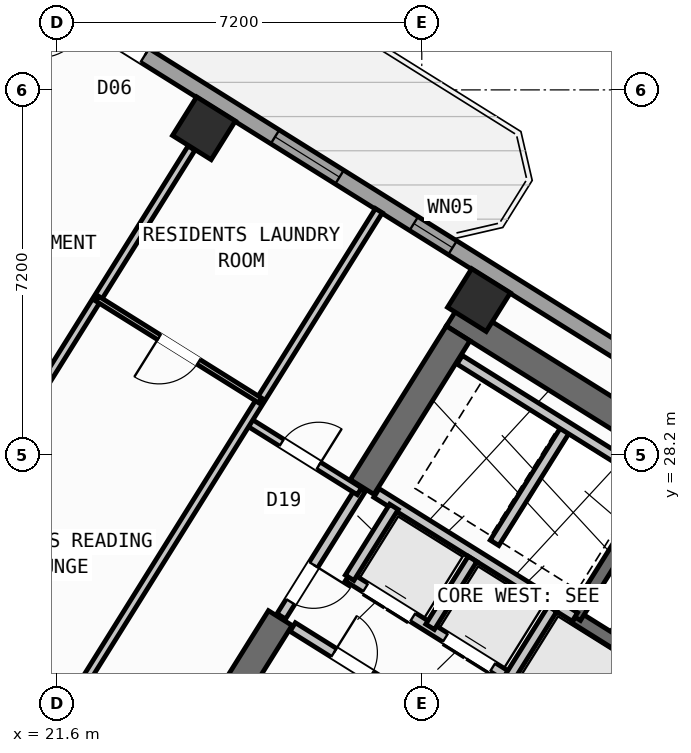
"""IFC4 building model, lengths in metres.
Left out: names, types, materials, properties, quantities, classifications, styles, units other than length and angle.
Written with IfcOpenShell. Run it as: python <this file> out.ifc"""

import sys

from ifc_helpers import new_model, si_unit, direction, frame, frame_2d, origin, origin_2d, place, context, subcontext, project, spatial, rectangle, hollow_rectangle, extrude, source, transform, mapped, element, fill, save


model = new_model("IFC4")
c1 = context("Model", 3, precision=1e-05, world=origin(), true_north=direction((0.0, 1.0)))
c2 = subcontext(c1, "Body", "Model", "MODEL_VIEW")
j1 = project(units=[si_unit("LENGTHUNIT", "METRE"), si_unit("PLANEANGLEUNIT", "RADIAN")], contexts=[c1])
p1 = place(None, origin())
s1 = spatial("IfcSite", under=j1, at=p1, CompositionType="ELEMENT")
p2 = place(p1, origin())
s2 = spatial("IfcBuilding", under=s1, at=p2, CompositionType="ELEMENT")
p3 = place(p2, frame((0.0, 0.0, 151.5)))
s3 = spatial("IfcBuildingStorey", under=s2, at=p3, CompositionType="ELEMENT", Elevation=151.5)
p4 = place(p3, frame((40.573, 24.01, 0.0), z_axis=(0.0, 0.0, 1.0), x_axis=(-0.848047359947, 0.529920442413, 0.0)))
e1 = element("IfcWall", 1, at=p4, inside=s3, PredefinedType="SHEAR", context=c2, shape_type="SweptSolid", body=[
    extrude(rectangle(XDim=13.14, YDim=0.55, at=frame_2d((6.57, 0.0))), origin(), (0.0, 0.0, 1.0), 3.35),
])
p5 = place(p3, frame((29.517, 30.594, 0.0), z_axis=(0.0, 0.0, 1.0), x_axis=(-0.529906864564, -0.848055844204, 0.0)))
e2 = element("IfcWall", 2, at=p5, inside=s3, PredefinedType="SHEAR", context=c2, shape_type="SweptSolid", body=[
    extrude(rectangle(XDim=3.575, YDim=0.55, at=frame_2d((1.788, 0.0))), origin(), (0.0, 0.0, 1.0), 3.35),
])
p6 = place(p3, frame((26.007, 24.976, 0.0), z_axis=(0.0, 0.0, 1.0), x_axis=(-0.529923795287, -0.848045264823, 0.0)))
e3 = element("IfcWall", 3, at=p6, inside=s3, PredefinedType="SHEAR", context=c2, shape_type="SweptSolid", body=[
    extrude(rectangle(XDim=6.425, YDim=0.55, at=frame_2d((3.212, 0.0))), origin(), (0.0, 0.0, 1.0), 3.35),
])
m1 = source(origin(), c2, "Body", "SweptSolid", [
    extrude(hollow_rectangle(XDim=0.9, YDim=0.9, WallThickness=0.036, at=origin_2d()), origin(), (0.0, 0.0, 1.0), 3.6),
])
for number, where, z_axis, x_axis in (
    (4, (29.928, 31.251, 0.0), (0.0, 0.0, 1.0), (-0.848, 0.53, 0.0)),
    (5, (24.5, 34.643, 0.0), (0.0, 0.0, 1.0), (-0.848, 0.53, 0.0)),
):
    element("IfcColumn", number, at=place(p3, frame(where, z_axis=z_axis, x_axis=x_axis)), inside=s3, PredefinedType="COLUMN", context=c2, shape_type="MappedRepresentation", body=[
        mapped(m1, transform((0.0, 0.0, 0.0), scale=1.0)),
    ])
p7 = place(p3, frame((14.138, 41.825, 0.0), z_axis=(0.0, 0.0, 1.0), x_axis=(0.848046498049, -0.529921821731, 0.0)))
e6 = element("IfcWall", 6, at=p7, inside=s3, PredefinedType="STANDARD", context=c2, shape_type="SweptSolid", body=[
    extrude(rectangle(XDim=31.588, YDim=0.32, at=frame_2d((15.794, 0.0))), origin(), (0.0, 0.0, 1.0), 3.35),
])
p8 = place(p7, frame((9.792, 0.0, 0.0)))
e7 = element("IfcOpeningElement", 7, at=p8, cuts=e6, PredefinedType="OPENING", context=c2, shape_type="SweptSolid", body=[
    extrude(rectangle(XDim=1.05, YDim=2.15, at=frame_2d((0.525, 1.075))), frame((0.0, 0.17, 0.0), z_axis=(0.0, -1.0, 0.0), x_axis=(1.0, 0.0, 0.0)), (0.0, 0.0, 1.0), 0.34),
])
p9 = place(p7, frame((0.791, 0.0, 0.85)))
e8 = element("IfcOpeningElement", 8, at=p9, cuts=e6, PredefinedType="OPENING", context=c2, shape_type="SweptSolid", body=[
    extrude(rectangle(XDim=1.8, YDim=1.5, at=frame_2d((0.9, 0.75))), frame((0.0, 0.17, 0.0), z_axis=(0.0, -1.0, 0.0), x_axis=(1.0, 0.0, 0.0)), (0.0, 0.0, 1.0), 0.34),
])
p10 = place(p7, frame((3.996, 0.0, 0.95)))
e9 = element("IfcOpeningElement", 9, at=p10, cuts=e6, PredefinedType="OPENING", context=c2, shape_type="SweptSolid", body=[
    extrude(rectangle(XDim=1.2, YDim=1.4, at=frame_2d((0.6, 0.7))), frame((0.0, 0.17, 0.0), z_axis=(0.0, -1.0, 0.0), x_axis=(1.0, 0.0, 0.0)), (0.0, 0.0, 1.0), 0.34),
])
p11 = place(p7, frame((13.874, 0.0, 0.85)))
e10 = element("IfcOpeningElement", 10, at=p11, cuts=e6, PredefinedType="OPENING", context=c2, shape_type="SweptSolid", body=[
    extrude(rectangle(XDim=1.5, YDim=1.5, at=frame_2d((0.75, 0.75))), frame((0.0, 0.17, 0.0), z_axis=(0.0, -1.0, 0.0), x_axis=(1.0, 0.0, 0.0)), (0.0, 0.0, 1.0), 0.34),
])
p12 = place(p7, frame((17.104, 0.0, 1.0)))
e11 = element("IfcOpeningElement", 11, at=p12, cuts=e6, PredefinedType="OPENING", context=c2, shape_type="SweptSolid", body=[
    extrude(rectangle(XDim=0.9, YDim=1.25, at=frame_2d((0.45, 0.625))), frame((0.0, 0.17, 0.0), z_axis=(0.0, -1.0, 0.0), x_axis=(1.0, 0.0, 0.0)), (0.0, 0.0, 1.0), 0.34),
])
p13 = place(p7, frame((22.069, 0.0, 1.0)))
e12 = element("IfcOpeningElement", 12, at=p13, cuts=e6, PredefinedType="OPENING", context=c2, shape_type="SweptSolid", body=[
    extrude(rectangle(XDim=0.9, YDim=1.25, at=frame_2d((0.45, 0.625))), frame((0.0, 0.17, 0.0), z_axis=(0.0, -1.0, 0.0), x_axis=(1.0, 0.0, 0.0)), (0.0, 0.0, 1.0), 0.34),
])
p14 = place(p7, frame((27.519, 0.0, 1.0)))
e13 = element("IfcOpeningElement", 13, at=p14, cuts=e6, PredefinedType="OPENING", context=c2, shape_type="SweptSolid", body=[
    extrude(rectangle(XDim=0.9, YDim=1.25, at=frame_2d((0.45, 0.625))), frame((0.0, 0.17, 0.0), z_axis=(0.0, -1.0, 0.0), x_axis=(1.0, 0.0, 0.0)), (0.0, 0.0, 1.0), 0.34),
])
p15 = place(p3, frame((38.046, 21.108, 0.0), z_axis=(0.0, 0.0, 1.0), x_axis=(-0.848054434086, 0.529909121291, 0.0)))
e14 = element("IfcWall", 14, at=p15, inside=s3, PredefinedType="SHEAR", context=c2, shape_type="SweptSolid", body=[
    extrude(rectangle(XDim=7.33, YDim=0.26, at=frame_2d((3.665, 0.0))), origin(), (0.0, 0.0, 1.0), 3.35),
])
p16 = place(p15, frame((0.22, 0.0, 0.0)))
e15 = element("IfcOpeningElement", 15, at=p16, cuts=e14, PredefinedType="OPENING", context=c2, shape_type="SweptSolid", body=[
    extrude(rectangle(XDim=1.1, YDim=2.1, at=frame_2d((0.55, 1.05))), frame((0.0, 0.14, 0.0), z_axis=(0.0, -1.0, 0.0), x_axis=(1.0, 0.0, 0.0)), (0.0, 0.0, 1.0), 0.28),
])
p17 = place(p3, frame((33.496, 27.677, 0.0), z_axis=(0.0, 0.0, 1.0), x_axis=(-0.529908658664, -0.84805472316, 0.0)))
e16 = element("IfcWall", 16, at=p17, inside=s3, PredefinedType="SHEAR", context=c2, shape_type="SweptSolid", body=[
    extrude(rectangle(XDim=3.16, YDim=0.26, at=frame_2d((1.58, 0.0))), origin(), (0.0, 0.0, 1.0), 3.35),
])
p18 = place(p3, frame((31.822, 24.998, 0.0), z_axis=(0.0, 0.0, 1.0), x_axis=(-0.848036912365, 0.52993716162, 0.0)))
e17 = element("IfcWall", 17, at=p18, inside=s3, PredefinedType="STANDARD", context=c2, shape_type="SweptSolid", body=[
    extrude(rectangle(XDim=4.618, YDim=0.2, at=frame_2d((2.309, 0.0))), origin(), (0.0, 0.0, 1.0), 3.34),
])
p19 = place(p3, frame((32.108, 22.814, 0.0), z_axis=(0.0, 0.0, 1.0), x_axis=(-0.848042229521, 0.529928652696, 0.0)))
e18 = element("IfcWall", 18, at=p19, inside=s3, PredefinedType="STANDARD", context=c2, shape_type="SweptSolid", body=[
    extrude(rectangle(XDim=5.62, YDim=0.2, at=frame_2d((2.81, 0.0))), origin(), (0.0, 0.0, 1.0), 3.34),
])
p20 = place(p19, frame((0.39, 0.0, 0.0)))
e19 = element("IfcOpeningElement", 19, at=p20, cuts=e18, PredefinedType="OPENING", context=c2, shape_type="SweptSolid", body=[
    extrude(rectangle(XDim=1.1, YDim=2.15, at=frame_2d((0.55, 1.075))), frame((0.0, 0.11, 0.0), z_axis=(0.0, -1.0, 0.0), x_axis=(1.0, 0.0, 0.0)), (0.0, 0.0, 1.0), 0.22),
])
p21 = place(p19, frame((2.25, 0.0, 0.0)))
e20 = element("IfcOpeningElement", 20, at=p21, cuts=e18, PredefinedType="OPENING", context=c2, shape_type="SweptSolid", body=[
    extrude(rectangle(XDim=1.1, YDim=2.15, at=frame_2d((0.55, 1.075))), frame((0.0, 0.11, 0.0), z_axis=(0.0, -1.0, 0.0), x_axis=(1.0, 0.0, 0.0)), (0.0, 0.0, 1.0), 0.22),
])
p22 = place(p19, frame((4.11, 0.0, 0.0)))
e21 = element("IfcOpeningElement", 21, at=p22, cuts=e18, PredefinedType="OPENING", context=c2, shape_type="SweptSolid", body=[
    extrude(rectangle(XDim=1.1, YDim=2.15, at=frame_2d((0.55, 1.075))), frame((0.0, 0.11, 0.0), z_axis=(0.0, -1.0, 0.0), x_axis=(1.0, 0.0, 0.0)), (0.0, 0.0, 1.0), 0.22),
])
p23 = place(p3, frame((32.982, 24.213, 0.0), z_axis=(0.0, 0.0, 1.0), x_axis=(-0.529839334948, -0.84809803628, 0.0)))
e22 = element("IfcWall", 22, at=p23, inside=s3, PredefinedType="STANDARD", context=c2, shape_type="SweptSolid", body=[
    extrude(rectangle(XDim=1.65, YDim=0.2, at=frame_2d((0.825, 0.0))), origin(), (0.0, 0.0, 1.0), 3.34),
])
p24 = place(p3, frame((28.25, 27.17, 0.0), z_axis=(0.0, 0.0, 1.0), x_axis=(-0.529905827651, -0.848056492117, 0.0)))
e23 = element("IfcWall", 23, at=p24, inside=s3, PredefinedType="STANDARD", context=c2, shape_type="SweptSolid", body=[
    extrude(rectangle(XDim=1.65, YDim=0.2, at=frame_2d((0.825, 0.0))), origin(), (0.0, 0.0, 1.0), 3.34),
])
p25 = place(p3, frame((31.645, 28.716, 0.0), z_axis=(0.0, 0.0, 1.0), x_axis=(-0.52986693015, -0.848080795876, 0.0)))
e24 = element("IfcWall", 24, at=p25, inside=s3, PredefinedType="STANDARD", context=c2, shape_type="SweptSolid", body=[
    extrude(rectangle(XDim=2.66, YDim=0.2, at=frame_2d((1.33, 0.0))), origin(), (0.0, 0.0, 1.0), 3.34),
])
p26 = place(p3, frame((33.363, 27.69, 0.0), z_axis=(0.0, 0.0, 1.0), x_axis=(-0.848047090064, 0.529920874315, 0.0)))
e25 = element("IfcWall", 25, at=p26, inside=s3, PredefinedType="STANDARD", context=c2, shape_type="SweptSolid", body=[
    extrude(rectangle(XDim=4.498, YDim=0.2, at=frame_2d((2.249, 0.0))), origin(), (0.0, 0.0, 1.0), 3.34),
])
for number, where, z_axis, x_axis in (
    (26, (31.379, 25.156, 0.0), (0.0, 0.0, 1.0), (-0.53, -0.848, 0.0)),
    (27, (29.801, 26.142, 0.0), (0.0, 0.0, 1.0), (-0.53, -0.848, 0.0)),
):
    element("IfcWall", number, at=place(p3, frame(where, z_axis=z_axis, x_axis=x_axis)), inside=s3, PredefinedType="STANDARD", context=c2, shape_type="SweptSolid", body=[
        extrude(rectangle(XDim=1.58, YDim=0.2, at=frame_2d((0.79, 0.0))), origin(), (0.0, 0.0, 1.0), 3.34),
    ])
p27 = place(p3, frame((31.525, 21.504, 0.0), z_axis=(0.0, 0.0, 1.0), x_axis=(-0.848040211232, 0.529931882541, 0.0)))
e28 = element("IfcWall", 28, at=p27, inside=s3, PredefinedType="STANDARD", context=c2, shape_type="SweptSolid", body=[
    extrude(rectangle(XDim=6.218, YDim=0.2, at=frame_2d((3.109, 0.0))), origin(), (0.0, 0.0, 1.0), 3.34),
])
p28 = place(p27, frame((4.4, 0.0, 0.0)))
e29 = element("IfcOpeningElement", 29, at=p28, cuts=e28, PredefinedType="OPENING", context=c2, shape_type="SweptSolid", body=[
    extrude(rectangle(XDim=0.86, YDim=2.05, at=frame_2d((0.43, 1.025))), frame((0.0, 0.11, 0.0), z_axis=(0.0, -1.0, 0.0), x_axis=(1.0, 0.0, 0.0)), (0.0, 0.0, 1.0), 0.22),
])
p29 = place(p27, frame((0.35, 0.0, 0.0)))
e30 = element("IfcOpeningElement", 30, at=p29, cuts=e28, PredefinedType="OPENING", context=c2, shape_type="SweptSolid", body=[
    extrude(rectangle(XDim=0.86, YDim=2.05, at=frame_2d((0.43, 1.025))), frame((0.0, 0.11, 0.0), z_axis=(0.0, -1.0, 0.0), x_axis=(1.0, 0.0, 0.0)), (0.0, 0.0, 1.0), 0.22),
])
p30 = place(p3, frame((27.596, 27.52, 0.0), z_axis=(0.0, 0.0, 1.0), x_axis=(-0.529865479138, -0.848081702443, 0.0)))
e31 = element("IfcWall", 31, at=p30, inside=s3, PredefinedType="STANDARD", context=c2, shape_type="SweptSolid", body=[
    extrude(rectangle(XDim=2.96, YDim=0.2, at=frame_2d((1.48, 0.0))), origin(), (0.0, 0.0, 1.0), 3.34),
])
p31 = place(p30, frame((1.76, 0.0, 0.0)))
e32 = element("IfcOpeningElement", 32, at=p31, cuts=e31, PredefinedType="OPENING", context=c2, shape_type="SweptSolid", body=[
    extrude(rectangle(XDim=0.86, YDim=2.05, at=frame_2d((0.43, 1.025))), frame((0.0, 0.11, 0.0), z_axis=(0.0, -1.0, 0.0), x_axis=(1.0, 0.0, 0.0)), (0.0, 0.0, 1.0), 0.22),
])
p32 = place(p3, frame((27.57, 27.478, 0.0), z_axis=(0.0, 0.0, 1.0), x_axis=(-0.848050851465, 0.529914854792, 0.0)))
e33 = element("IfcWall", 33, at=p32, inside=s3, PredefinedType="PARTITIONING", context=c2, shape_type="SweptSolid", body=[
    extrude(rectangle(XDim=2.61, YDim=0.16, at=frame_2d((1.305, 0.0))), origin(), (0.0, 0.0, 1.0), 3.34),
])
p33 = place(p32, frame((0.95, 0.0, 0.0)))
e34 = element("IfcOpeningElement", 34, at=p33, cuts=e33, PredefinedType="OPENING", context=c2, shape_type="SweptSolid", body=[
    extrude(rectangle(XDim=0.86, YDim=2.05, at=frame_2d((0.43, 1.025))), frame((0.0, 0.09, 0.0), z_axis=(0.0, -1.0, 0.0), x_axis=(1.0, 0.0, 0.0)), (0.0, 0.0, 1.0), 0.18),
])
p34 = place(p3, frame((27.953, 33.016, 0.0), z_axis=(0.0, 0.0, 1.0), x_axis=(-0.529905022231, -0.848056995381, 0.0)))
e35 = element("IfcWall", 35, at=p34, inside=s3, PredefinedType="PARTITIONING", context=c2, shape_type="SweptSolid", body=[
    extrude(rectangle(XDim=11.45, YDim=0.16, at=frame_2d((5.725, 0.0))), origin(), (0.0, 0.0, 1.0), 3.34),
])
p35 = place(p3, frame((21.885, 23.306, 0.0), z_axis=(0.0, 0.0, 1.0), x_axis=(-0.848052408131, 0.529912363569, 0.0)))
e36 = element("IfcWall", 36, at=p35, inside=s3, PredefinedType="PARTITIONING", context=c2, shape_type="SweptSolid", body=[
    extrude(rectangle(XDim=16.73, YDim=0.16, at=frame_2d((8.365, 0.0))), origin(), (0.0, 0.0, 1.0), 3.34),
])
p36 = place(p35, frame((1.395, 0.0, 0.0)))
e37 = element("IfcOpeningElement", 37, at=p36, cuts=e36, PredefinedType="OPENING", context=c2, shape_type="SweptSolid", body=[
    extrude(rectangle(XDim=1.0, YDim=2.1, at=frame_2d((0.5, 1.05))), frame((0.0, 0.09, 0.0), z_axis=(0.0, -1.0, 0.0), x_axis=(1.0, 0.0, 0.0)), (0.0, 0.0, 1.0), 0.18),
])
p37 = place(p35, frame((7.82, 0.0, 0.0)))
e38 = element("IfcOpeningElement", 38, at=p37, cuts=e36, PredefinedType="OPENING", context=c2, shape_type="SweptSolid", body=[
    extrude(rectangle(XDim=1.0, YDim=2.1, at=frame_2d((0.5, 1.05))), frame((0.0, 0.09, 0.0), z_axis=(0.0, -1.0, 0.0), x_axis=(1.0, 0.0, 0.0)), (0.0, 0.0, 1.0), 0.18),
])
p38 = place(p35, frame((11.14, 0.0, 0.0)))
e39 = element("IfcOpeningElement", 39, at=p38, cuts=e36, PredefinedType="OPENING", context=c2, shape_type="SweptSolid", body=[
    extrude(rectangle(XDim=1.0, YDim=2.1, at=frame_2d((0.5, 1.05))), frame((0.0, 0.09, 0.0), z_axis=(0.0, -1.0, 0.0), x_axis=(1.0, 0.0, 0.0)), (0.0, 0.0, 1.0), 0.18),
])
p39 = place(p3, frame((24.256, 34.251, 0.0), z_axis=(0.0, 0.0, 1.0), x_axis=(-0.529919772691, -0.848047778437, 0.0)))
e40 = element("IfcWall", 40, at=p39, inside=s3, PredefinedType="PARTITIONING", context=c2, shape_type="SweptSolid", body=[
    extrude(rectangle(XDim=6.376, YDim=0.16, at=frame_2d((3.188, 0.0))), origin(), (0.0, 0.0, 1.0), 2.775),
])
p40 = place(p3, frame((25.612, 29.269, 0.0), z_axis=(0.0, 0.0, 1.0), x_axis=(-0.84803087207, 0.529946827537, 0.0)))
e41 = element("IfcWall", 41, at=p40, inside=s3, PredefinedType="PARTITIONING", context=c2, shape_type="SweptSolid", body=[
    extrude(rectangle(XDim=3.79, YDim=0.11, at=frame_2d((1.895, 0.0))), origin(), (0.0, 0.0, 1.0), 3.34),
])
p41 = place(p40, frame((1.435, 0.0, 0.0)))
e42 = element("IfcOpeningElement", 42, at=p41, cuts=e41, PredefinedType="OPENING", context=c2, shape_type="SweptSolid", body=[
    extrude(rectangle(XDim=0.92, YDim=2.08, at=frame_2d((0.46, 1.04))), frame((0.0, 0.065, 0.0), z_axis=(0.0, -1.0, 0.0), x_axis=(1.0, 0.0, 0.0)), (0.0, 0.0, 1.0), 0.13),
])
p42 = place(p3, frame((21.517, 37.356, 0.0), z_axis=(0.0, 0.0, 1.0), x_axis=(-0.529919705034, -0.848047820713, 0.0)))
e43 = element("IfcWall", 43, at=p42, inside=s3, PredefinedType="PARTITIONING", context=c2, shape_type="SweptSolid", body=[
    extrude(rectangle(XDim=9.14, YDim=0.11, at=frame_2d((4.57, 0.0))), origin(), (0.0, 0.0, 1.0), 3.34),
])
p43 = place(p42, frame((0.47, 0.0, 0.0)))
e44 = element("IfcOpeningElement", 44, at=p43, cuts=e43, PredefinedType="OPENING", context=c2, shape_type="SweptSolid", body=[
    extrude(rectangle(XDim=0.92, YDim=2.08, at=frame_2d((0.46, 1.04))), frame((0.0, 0.065, 0.0), z_axis=(0.0, -1.0, 0.0), x_axis=(1.0, 0.0, 0.0)), (0.0, 0.0, 1.0), 0.13),
])
m2 = source(origin(), c2, "Body", "SweptSolid", [
    extrude(rectangle(XDim=1.05, YDim=2.15, at=frame_2d((0.525, 1.075))), frame((0.0, 0.025, 0.0), z_axis=(0.0, -1.0, 0.0), x_axis=(1.0, 0.0, 0.0)), (0.0, 0.0, 1.0), 0.05),
])
p44 = place(p8, origin())
e45 = element("IfcDoor", 45, at=p44, inside=s3, OperationType="SINGLE_SWING_RIGHT", PredefinedType="DOOR", context=c2, shape_type="MappedRepresentation", body=[
    mapped(m2, transform((0.0, 0.0, 0.0), scale=1.0)),
])
fill(e7, e45)
m3 = source(origin(), c2, "Body", "SweptSolid", [
    extrude(rectangle(XDim=1.5, YDim=1.5, at=frame_2d((0.75, 0.75))), frame((0.0, 0.03, 0.0), z_axis=(0.0, -1.0, 0.0), x_axis=(1.0, 0.0, 0.0)), (0.0, 0.0, 1.0), 0.06),
])
p45 = place(p11, origin())
e46 = element("IfcWindow", 46, at=p45, inside=s3, PartitioningType="SINGLE_PANEL", PredefinedType="WINDOW", context=c2, shape_type="MappedRepresentation", body=[
    mapped(m3, transform((0.0, 0.0, 0.0), scale=1.0)),
])
fill(e10, e46)
m4 = source(origin(), c2, "Body", "SweptSolid", [
    extrude(rectangle(XDim=0.9, YDim=1.25, at=frame_2d((0.45, 0.625))), frame((0.0, 0.03, 0.0), z_axis=(0.0, -1.0, 0.0), x_axis=(1.0, 0.0, 0.0)), (0.0, 0.0, 1.0), 0.06),
])
p46 = place(p12, origin())
e47 = element("IfcWindow", 47, at=p46, inside=s3, PartitioningType="SINGLE_PANEL", PredefinedType="WINDOW", context=c2, shape_type="MappedRepresentation", body=[
    mapped(m4, transform((0.0, 0.0, 0.0), scale=1.0)),
])
fill(e11, e47)
m5 = source(origin(), c2, "Body", "SweptSolid", [
    extrude(rectangle(XDim=1.1, YDim=2.15, at=frame_2d((0.55, 1.075))), frame((0.0, 0.025, 0.0), z_axis=(0.0, -1.0, 0.0), x_axis=(1.0, 0.0, 0.0)), (0.0, 0.0, 1.0), 0.05),
])
p47 = place(p21, origin())
e48 = element("IfcDoor", 48, at=p47, inside=s3, OperationType="DOUBLE_DOOR_SLIDING", PredefinedType="DOOR", context=c2, shape_type="MappedRepresentation", body=[
    mapped(m5, transform((0.0, 0.0, 0.0), scale=1.0)),
])
fill(e20, e48)
p48 = place(p22, origin())
e49 = element("IfcDoor", 49, at=p48, inside=s3, OperationType="DOUBLE_DOOR_SLIDING", PredefinedType="DOOR", context=c2, shape_type="MappedRepresentation", body=[
    mapped(m5, transform((0.0, 0.0, 0.0), scale=1.0)),
])
fill(e21, e49)
m6 = source(origin(), c2, "Body", "SweptSolid", [
    extrude(rectangle(XDim=0.86, YDim=2.05, at=frame_2d((0.43, 1.025))), frame((0.0, 0.025, 0.0), z_axis=(0.0, -1.0, 0.0), x_axis=(1.0, 0.0, 0.0)), (0.0, 0.0, 1.0), 0.05),
])
p49 = place(p28, frame((0.86, 0.0, 0.0), z_axis=(0.0, 0.0, 1.0), x_axis=(-1.0, 0.0, 0.0)))
e50 = element("IfcDoor", 50, at=p49, inside=s3, OperationType="SINGLE_SWING_LEFT", PredefinedType="DOOR", context=c2, shape_type="MappedRepresentation", body=[
    mapped(m6, transform((0.0, 0.0, 0.0), scale=1.0)),
])
fill(e29, e50)
p50 = place(p33, frame((0.86, 0.0, 0.0), z_axis=(0.0, 0.0, 1.0), x_axis=(-1.0, 0.0, 0.0)))
e51 = element("IfcDoor", 51, at=p50, inside=s3, OperationType="SINGLE_SWING_RIGHT", PredefinedType="DOOR", context=c2, shape_type="MappedRepresentation", body=[
    mapped(m6, transform((0.0, 0.0, 0.0), scale=1.0)),
])
fill(e34, e51)
p51 = place(p31, origin())
e52 = element("IfcDoor", 52, at=p51, inside=s3, OperationType="SINGLE_SWING_LEFT", PredefinedType="DOOR", context=c2, shape_type="MappedRepresentation", body=[
    mapped(m6, transform((0.0, 0.0, 0.0), scale=1.0)),
])
fill(e32, e52)
m7 = source(origin(), c2, "Body", "SweptSolid", [
    extrude(rectangle(XDim=0.92, YDim=2.08, at=frame_2d((0.46, 1.04))), frame((0.0, 0.025, 0.0), z_axis=(0.0, -1.0, 0.0), x_axis=(1.0, 0.0, 0.0)), (0.0, 0.0, 1.0), 0.05),
])
p52 = place(p41, origin())
e53 = element("IfcDoor", 53, at=p52, inside=s3, OperationType="SINGLE_SWING_RIGHT", PredefinedType="DOOR", context=c2, shape_type="MappedRepresentation", body=[
    mapped(m7, transform((0.0, 0.0, 0.0), scale=1.0)),
])
fill(e42, e53)
save(model, sys.argv[1])
